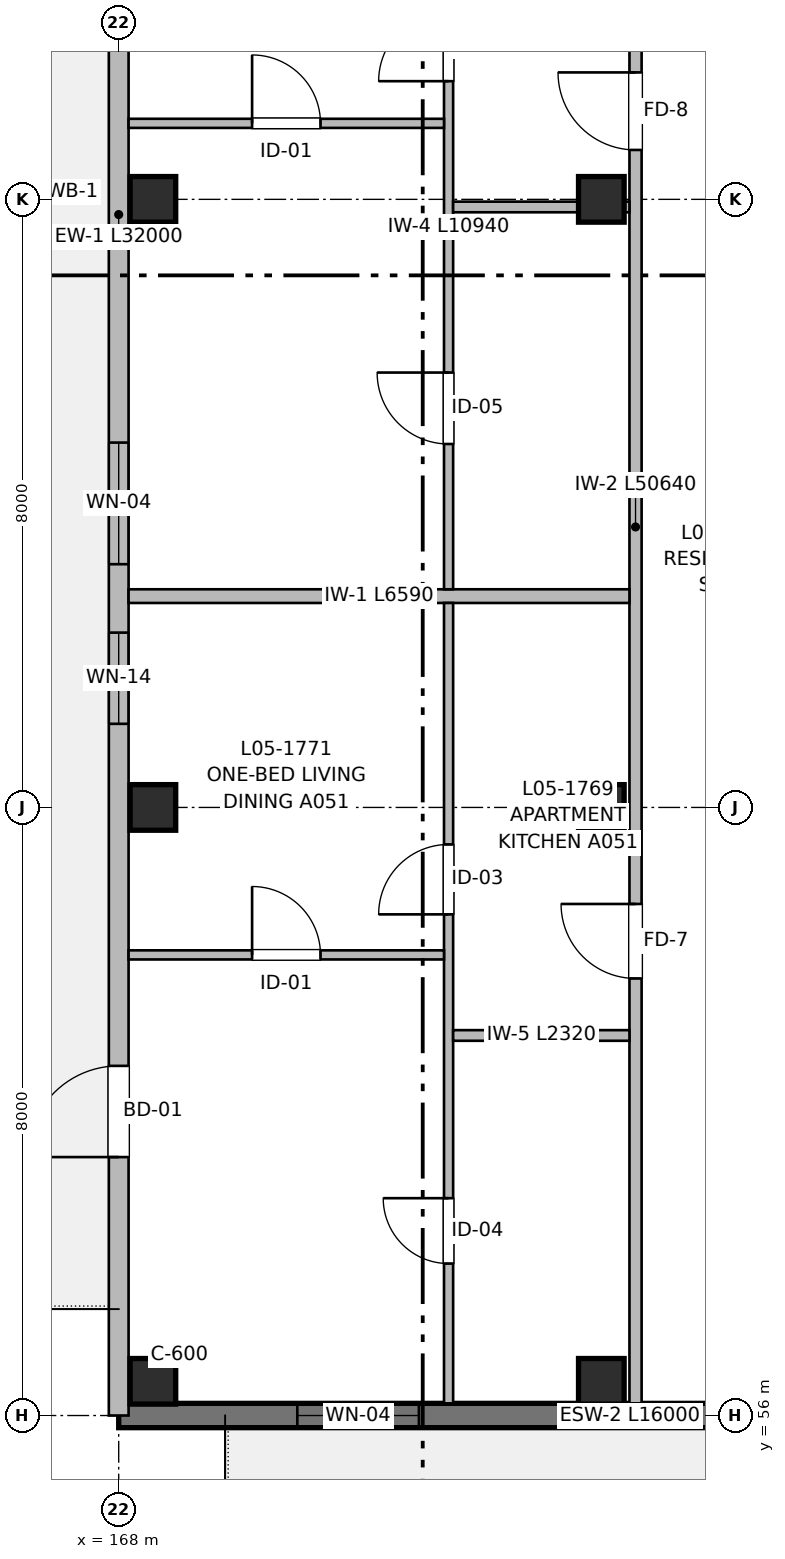
"""IFC4 building model, lengths in metres.
Left out: names, types, materials, properties, quantities, classifications, styles, units other than length and angle.
Written with IfcOpenShell. Run it as: python <this file> out.ifc"""

import sys

from ifc_helpers import new_model, si_unit, direction, frame, frame_2d, origin, origin_2d, place, context, subcontext, project, spatial, rectangle, extrude, element, fill, save


model = new_model("IFC4")
c1 = context("Model", 3, precision=1e-05, world=origin(), true_north=direction((0.0, 1.0)))
c2 = subcontext(c1, "Body", "Model", "MODEL_VIEW")
j1 = project(units=[si_unit("LENGTHUNIT", "METRE"), si_unit("PLANEANGLEUNIT", "RADIAN")], contexts=[c1])
p1 = place(None, origin())
s1 = spatial("IfcSite", under=j1, at=p1, CompositionType="ELEMENT")
p2 = place(p1, origin())
s2 = spatial("IfcBuilding", under=s1, at=p2, CompositionType="ELEMENT")
p3 = place(p2, frame((0.0, 0.0, 16.96)))
s3 = spatial("IfcBuildingStorey", under=s2, at=p3, CompositionType="ELEMENT", Elevation=16.96)
for number, where, z_axis, x_axis in (
    (1, (168.45, 56.45, 0.0), (0.0, 0.0, 1.0), (1.0, 0.0, 0.0)),
    (2, (168.45, 64.0, 0.0), (0.0, 0.0, 1.0), (1.0, 0.0, 0.0)),
    (3, (168.45, 72.0, 0.0), (0.0, 0.0, 1.0), (1.0, 0.0, 0.0)),
    (4, (174.35, 56.45, 0.0), (0.0, 0.0, 1.0), (1.0, 0.0, 0.0)),
    (5, (174.35, 64.0, 0.0), (0.0, 0.0, 1.0), (1.0, 0.0, 0.0)),
    (6, (174.35, 72.0, 0.0), (0.0, 0.0, 1.0), (1.0, 0.0, 0.0)),
):
    element("IfcColumn", number, at=place(p3, frame(where, z_axis=z_axis, x_axis=x_axis)), inside=s3, PredefinedType="COLUMN", context=c2, shape_type="SweptSolid", body=[
        extrude(rectangle(XDim=0.6, YDim=0.6, at=origin_2d()), origin(), (0.0, 0.0, 1.0), 3.2),
    ])
p4 = place(p3, frame((184.0, 56.0, 0.0), z_axis=(0.0, 0.0, 1.0), x_axis=(-1.0, 0.0, 0.0)))
e7 = element("IfcWall", 7, at=p4, inside=s3, PredefinedType="SHEAR", context=c2, shape_type="SweptSolid", body=[
    extrude(rectangle(XDim=16.0, YDim=0.32, at=frame_2d((8.0, 0.0))), origin(), (0.0, 0.0, 1.0), 2.98),
])
p5 = place(p4, frame((3.4, 0.0, 0.0)))
e8 = element("IfcOpeningElement", 8, at=p5, cuts=e7, PredefinedType="OPENING", context=c2, shape_type="SweptSolid", body=[
    extrude(rectangle(XDim=1.2, YDim=2.2, at=frame_2d((0.6, 1.1))), frame((0.0, 0.17, 0.0), z_axis=(0.0, -1.0, 0.0), x_axis=(1.0, 0.0, 0.0)), (0.0, 0.0, 1.0), 0.34),
])
p6 = place(p4, frame((5.3, 0.0, 0.9)))
e9 = element("IfcOpeningElement", 9, at=p6, cuts=e7, PredefinedType="OPENING", context=c2, shape_type="SweptSolid", body=[
    extrude(rectangle(XDim=1.2, YDim=1.05, at=frame_2d((0.6, 0.525))), frame((0.0, 0.17, 0.0), z_axis=(0.0, -1.0, 0.0), x_axis=(1.0, 0.0, 0.0)), (0.0, 0.0, 1.0), 0.34),
])
p7 = place(p4, frame((12.05, 0.0, 0.77)))
e10 = element("IfcOpeningElement", 10, at=p7, cuts=e7, PredefinedType="OPENING", context=c2, shape_type="SweptSolid", body=[
    extrude(rectangle(XDim=1.6, YDim=1.45, at=frame_2d((0.8, 0.725))), frame((0.0, 0.17, 0.0), z_axis=(0.0, -1.0, 0.0), x_axis=(1.0, 0.0, 0.0)), (0.0, 0.0, 1.0), 0.34),
])
p8 = place(p3, frame((168.0, 56.0, 0.0), z_axis=(0.0, 0.0, 1.0), x_axis=(0.0, 1.0, 0.0)))
e11 = element("IfcWall", 11, at=p8, inside=s3, PredefinedType="SOLIDWALL", context=c2, shape_type="SweptSolid", body=[
    extrude(rectangle(XDim=32.0, YDim=0.26, at=frame_2d((16.0, 0.0))), origin(), (0.0, 0.0, 1.0), 2.98),
])
p9 = place(p8, frame((3.4, 0.0, 0.0)))
e12 = element("IfcOpeningElement", 12, at=p9, cuts=e11, PredefinedType="OPENING", context=c2, shape_type="SweptSolid", body=[
    extrude(rectangle(XDim=1.2, YDim=2.2, at=frame_2d((0.6, 1.1))), frame((0.0, 0.14, 0.0), z_axis=(0.0, -1.0, 0.0), x_axis=(1.0, 0.0, 0.0)), (0.0, 0.0, 1.0), 0.28),
])
p10 = place(p8, frame((9.1, 0.0, 0.9)))
e13 = element("IfcOpeningElement", 13, at=p10, cuts=e11, PredefinedType="OPENING", context=c2, shape_type="SweptSolid", body=[
    extrude(rectangle(XDim=1.2, YDim=1.05, at=frame_2d((0.6, 0.525))), frame((0.0, 0.14, 0.0), z_axis=(0.0, -1.0, 0.0), x_axis=(1.0, 0.0, 0.0)), (0.0, 0.0, 1.0), 0.28),
])
p11 = place(p8, frame((11.2, 0.0, 0.77)))
e14 = element("IfcOpeningElement", 14, at=p11, cuts=e11, PredefinedType="OPENING", context=c2, shape_type="SweptSolid", body=[
    extrude(rectangle(XDim=1.6, YDim=1.45, at=frame_2d((0.8, 0.725))), frame((0.0, 0.14, 0.0), z_axis=(0.0, -1.0, 0.0), x_axis=(1.0, 0.0, 0.0)), (0.0, 0.0, 1.0), 0.28),
])
p12 = place(p8, frame((18.8, 0.0, 0.72)))
e15 = element("IfcOpeningElement", 15, at=p12, cuts=e11, PredefinedType="OPENING", context=c2, shape_type="SweptSolid", body=[
    extrude(rectangle(XDim=2.4, YDim=1.5, at=frame_2d((1.2, 0.75))), frame((0.0, 0.14, 0.0), z_axis=(0.0, -1.0, 0.0), x_axis=(1.0, 0.0, 0.0)), (0.0, 0.0, 1.0), 0.28),
])
p13 = place(p8, frame((27.25, 0.0, 0.82)))
e16 = element("IfcOpeningElement", 16, at=p13, cuts=e11, PredefinedType="OPENING", context=c2, shape_type="SweptSolid", body=[
    extrude(rectangle(XDim=1.5, YDim=1.4, at=frame_2d((0.75, 0.7))), frame((0.0, 0.14, 0.0), z_axis=(0.0, -1.0, 0.0), x_axis=(1.0, 0.0, 0.0)), (0.0, 0.0, 1.0), 0.28),
])
p14 = place(p8, frame((22.16, 0.0, 0.87)))
e17 = element("IfcOpeningElement", 17, at=p14, cuts=e11, PredefinedType="OPENING", context=c2, shape_type="SweptSolid", body=[
    extrude(rectangle(XDim=1.4, YDim=1.35, at=frame_2d((0.7, 0.675))), frame((0.0, 0.14, 0.0), z_axis=(0.0, -1.0, 0.0), x_axis=(1.0, 0.0, 0.0)), (0.0, 0.0, 1.0), 0.28),
])
p15 = place(p3, frame((174.8, 56.16, 0.0), z_axis=(0.0, 0.0, 1.0), x_axis=(0.0, 1.0, 0.0)))
e18 = element("IfcWall", 18, at=p15, inside=s3, PredefinedType="PARTITIONING", context=c2, shape_type="SweptSolid", body=[
    extrude(rectangle(XDim=50.64, YDim=0.16, at=frame_2d((25.32, 0.0))), origin(), (0.0, 0.0, 1.0), 2.935),
])
p16 = place(p15, frame((5.59, 0.0, 0.0)))
e19 = element("IfcOpeningElement", 19, at=p16, cuts=e18, PredefinedType="OPENING", context=c2, shape_type="SweptSolid", body=[
    extrude(rectangle(XDim=0.98, YDim=2.15, at=frame_2d((0.49, 1.075))), frame((0.0, 0.09, 0.0), z_axis=(0.0, -1.0, 0.0), x_axis=(1.0, 0.0, 0.0)), (0.0, 0.0, 1.0), 0.18),
])
p17 = place(p15, frame((16.49, 0.0, 0.0)))
e20 = element("IfcOpeningElement", 20, at=p17, cuts=e18, PredefinedType="OPENING", context=c2, shape_type="SweptSolid", body=[
    extrude(rectangle(XDim=1.02, YDim=2.15, at=frame_2d((0.51, 1.075))), frame((0.0, 0.09, 0.0), z_axis=(0.0, -1.0, 0.0), x_axis=(1.0, 0.0, 0.0)), (0.0, 0.0, 1.0), 0.18),
])
p18 = place(p15, frame((28.55, 0.0, 0.0)))
e21 = element("IfcOpeningElement", 21, at=p18, cuts=e18, PredefinedType="OPENING", context=c2, shape_type="SweptSolid", body=[
    extrude(rectangle(XDim=0.98, YDim=2.15, at=frame_2d((0.49, 1.075))), frame((0.0, 0.09, 0.0), z_axis=(0.0, -1.0, 0.0), x_axis=(1.0, 0.0, 0.0)), (0.0, 0.0, 1.0), 0.18),
])
p19 = place(p15, frame((42.9, 0.0, 0.0)))
e22 = element("IfcOpeningElement", 22, at=p19, cuts=e18, PredefinedType="OPENING", context=c2, shape_type="SweptSolid", body=[
    extrude(rectangle(XDim=0.98, YDim=2.15, at=frame_2d((0.49, 1.075))), frame((0.0, 0.09, 0.0), z_axis=(0.0, -1.0, 0.0), x_axis=(1.0, 0.0, 0.0)), (0.0, 0.0, 1.0), 0.18),
])
p20 = place(p3, frame((168.13, 66.78, 0.0), z_axis=(0.0, 0.0, 1.0), x_axis=(1.0, 0.0, 0.0)))
e23 = element("IfcWall", 23, at=p20, inside=s3, PredefinedType="PARTITIONING", context=c2, shape_type="SweptSolid", body=[
    extrude(rectangle(XDim=6.59, YDim=0.18, at=frame_2d((3.295, 0.0))), origin(), (0.0, 0.0, 1.0), 2.935),
])
p21 = place(p3, frame((172.34, 56.16, 0.0), z_axis=(0.0, 0.0, 1.0), x_axis=(0.0, 1.0, 0.0)))
e24 = element("IfcWall", 24, at=p21, inside=s3, PredefinedType="PARTITIONING", context=c2, shape_type="SweptSolid", body=[
    extrude(rectangle(XDim=10.53, YDim=0.12, at=frame_2d((5.265, 0.0))), origin(), (0.0, 0.0, 1.0), 2.935),
])
p22 = place(p21, frame((1.839, 0.0, 0.0)))
e25 = element("IfcOpeningElement", 25, at=p22, cuts=e24, PredefinedType="OPENING", context=c2, shape_type="SweptSolid", body=[
    extrude(rectangle(XDim=0.86, YDim=2.1, at=frame_2d((0.43, 1.05))), frame((0.0, 0.07, 0.0), z_axis=(0.0, -1.0, 0.0), x_axis=(1.0, 0.0, 0.0)), (0.0, 0.0, 1.0), 0.14),
])
p23 = place(p21, frame((6.433, 0.0, 0.0)))
e26 = element("IfcOpeningElement", 26, at=p23, cuts=e24, PredefinedType="OPENING", context=c2, shape_type="SweptSolid", body=[
    extrude(rectangle(XDim=0.92, YDim=2.1, at=frame_2d((0.46, 1.05))), frame((0.0, 0.07, 0.0), z_axis=(0.0, -1.0, 0.0), x_axis=(1.0, 0.0, 0.0)), (0.0, 0.0, 1.0), 0.14),
])
p24 = place(p3, frame((172.4, 61.0, 0.0), z_axis=(0.0, 0.0, 1.0), x_axis=(1.0, 0.0, 0.0)))
e27 = element("IfcWall", 27, at=p24, inside=s3, PredefinedType="PARTITIONING", context=c2, shape_type="SweptSolid", body=[
    extrude(rectangle(XDim=2.32, YDim=0.14, at=frame_2d((1.16, 0.0))), origin(), (0.0, 0.0, 1.0), 2.935),
])
p25 = place(p3, frame((168.13, 62.06, 0.0), z_axis=(0.0, 0.0, 1.0), x_axis=(1.0, 0.0, 0.0)))
e28 = element("IfcWall", 28, at=p25, inside=s3, PredefinedType="PARTITIONING", context=c2, shape_type="SweptSolid", body=[
    extrude(rectangle(XDim=4.15, YDim=0.12, at=frame_2d((2.075, 0.0))), origin(), (0.0, 0.0, 1.0), 2.935),
])
p26 = place(p25, frame((1.625, 0.0, 0.0)))
e29 = element("IfcOpeningElement", 29, at=p26, cuts=e28, PredefinedType="OPENING", context=c2, shape_type="SweptSolid", body=[
    extrude(rectangle(XDim=0.9, YDim=2.1, at=frame_2d((0.45, 1.05))), frame((0.0, 0.07, 0.0), z_axis=(0.0, -1.0, 0.0), x_axis=(1.0, 0.0, 0.0)), (0.0, 0.0, 1.0), 0.14),
])
p27 = place(p3, frame((172.34, 66.87, 0.0), z_axis=(0.0, 0.0, 1.0), x_axis=(0.0, 1.0, 0.0)))
e30 = element("IfcWall", 30, at=p27, inside=s3, PredefinedType="PARTITIONING", context=c2, shape_type="SweptSolid", body=[
    extrude(rectangle(XDim=10.94, YDim=0.12, at=frame_2d((5.47, 0.0))), origin(), (0.0, 0.0, 1.0), 2.935),
])
p28 = place(p27, frame((1.911, 0.0, 0.0)))
e31 = element("IfcOpeningElement", 31, at=p28, cuts=e30, PredefinedType="OPENING", context=c2, shape_type="SweptSolid", body=[
    extrude(rectangle(XDim=0.94, YDim=2.1, at=frame_2d((0.47, 1.05))), frame((0.0, 0.07, 0.0), z_axis=(0.0, -1.0, 0.0), x_axis=(1.0, 0.0, 0.0)), (0.0, 0.0, 1.0), 0.14),
])
p29 = place(p27, frame((6.685, 0.0, 0.0)))
e32 = element("IfcOpeningElement", 32, at=p29, cuts=e30, PredefinedType="OPENING", context=c2, shape_type="SweptSolid", body=[
    extrude(rectangle(XDim=0.92, YDim=2.1, at=frame_2d((0.46, 1.05))), frame((0.0, 0.07, 0.0), z_axis=(0.0, -1.0, 0.0), x_axis=(1.0, 0.0, 0.0)), (0.0, 0.0, 1.0), 0.14),
])
p30 = place(p3, frame((172.4, 71.9, 0.0), z_axis=(0.0, 0.0, 1.0), x_axis=(1.0, 0.0, 0.0)))
e33 = element("IfcWall", 33, at=p30, inside=s3, PredefinedType="PARTITIONING", context=c2, shape_type="SweptSolid", body=[
    extrude(rectangle(XDim=2.32, YDim=0.14, at=frame_2d((1.16, 0.0))), origin(), (0.0, 0.0, 1.0), 2.53),
])
p31 = place(p3, frame((168.13, 73.0, 0.0), z_axis=(0.0, 0.0, 1.0), x_axis=(1.0, 0.0, 0.0)))
e34 = element("IfcWall", 34, at=p31, inside=s3, PredefinedType="PARTITIONING", context=c2, shape_type="SweptSolid", body=[
    extrude(rectangle(XDim=4.15, YDim=0.12, at=frame_2d((2.075, 0.0))), origin(), (0.0, 0.0, 1.0), 2.935),
])
p32 = place(p31, frame((1.625, 0.0, 0.0)))
e35 = element("IfcOpeningElement", 35, at=p32, cuts=e34, PredefinedType="OPENING", context=c2, shape_type="SweptSolid", body=[
    extrude(rectangle(XDim=0.9, YDim=2.1, at=frame_2d((0.45, 1.05))), frame((0.0, 0.07, 0.0), z_axis=(0.0, -1.0, 0.0), x_axis=(1.0, 0.0, 0.0)), (0.0, 0.0, 1.0), 0.14),
])
p33 = place(p7, origin())
e36 = element("IfcWindow", 36, at=p33, inside=s3, PartitioningType="SINGLE_PANEL", PredefinedType="WINDOW", context=c2, shape_type="SweptSolid", body=[
    extrude(rectangle(XDim=1.6, YDim=1.45, at=frame_2d((0.8, 0.725))), frame((0.0, 0.03, 0.0), z_axis=(0.0, -1.0, 0.0), x_axis=(1.0, 0.0, 0.0)), (0.0, 0.0, 1.0), 0.06),
])
fill(e10, e36)
p34 = place(p9, origin())
e37 = element("IfcDoor", 37, at=p34, inside=s3, OperationType="SINGLE_SWING_LEFT", PredefinedType="DOOR", context=c2, shape_type="SweptSolid", body=[
    extrude(rectangle(XDim=1.2, YDim=2.2, at=frame_2d((0.6, 1.1))), frame((0.0, 0.025, 0.0), z_axis=(0.0, -1.0, 0.0), x_axis=(1.0, 0.0, 0.0)), (0.0, 0.0, 1.0), 0.05),
])
fill(e12, e37)
p35 = place(p10, origin())
e38 = element("IfcWindow", 38, at=p35, inside=s3, PartitioningType="SINGLE_PANEL", PredefinedType="WINDOW", context=c2, shape_type="SweptSolid", body=[
    extrude(rectangle(XDim=1.2, YDim=1.05, at=frame_2d((0.6, 0.525))), frame((0.0, 0.03, 0.0), z_axis=(0.0, -1.0, 0.0), x_axis=(1.0, 0.0, 0.0)), (0.0, 0.0, 1.0), 0.06),
])
fill(e13, e38)
p36 = place(p11, origin())
e39 = element("IfcWindow", 39, at=p36, inside=s3, PartitioningType="SINGLE_PANEL", PredefinedType="WINDOW", context=c2, shape_type="SweptSolid", body=[
    extrude(rectangle(XDim=1.6, YDim=1.45, at=frame_2d((0.8, 0.725))), frame((0.0, 0.03, 0.0), z_axis=(0.0, -1.0, 0.0), x_axis=(1.0, 0.0, 0.0)), (0.0, 0.0, 1.0), 0.06),
])
fill(e14, e39)
p37 = place(p22, origin())
e40 = element("IfcDoor", 40, at=p37, inside=s3, OperationType="SINGLE_SWING_RIGHT", PredefinedType="DOOR", context=c2, shape_type="SweptSolid", body=[
    extrude(rectangle(XDim=0.86, YDim=2.1, at=frame_2d((0.43, 1.05))), frame((0.0, 0.025, 0.0), z_axis=(0.0, -1.0, 0.0), x_axis=(1.0, 0.0, 0.0)), (0.0, 0.0, 1.0), 0.05),
])
fill(e25, e40)
p38 = place(p23, origin())
e41 = element("IfcDoor", 41, at=p38, inside=s3, OperationType="SINGLE_SWING_LEFT", PredefinedType="DOOR", context=c2, shape_type="SweptSolid", body=[
    extrude(rectangle(XDim=0.92, YDim=2.1, at=frame_2d((0.46, 1.05))), frame((0.0, 0.025, 0.0), z_axis=(0.0, -1.0, 0.0), x_axis=(1.0, 0.0, 0.0)), (0.0, 0.0, 1.0), 0.05),
])
fill(e26, e41)
p39 = place(p16, origin())
e42 = element("IfcDoor", 42, at=p39, inside=s3, OperationType="SINGLE_SWING_RIGHT", PredefinedType="DOOR", context=c2, shape_type="SweptSolid", body=[
    extrude(rectangle(XDim=0.98, YDim=2.15, at=frame_2d((0.49, 1.075))), frame((0.0, 0.025, 0.0), z_axis=(0.0, -1.0, 0.0), x_axis=(1.0, 0.0, 0.0)), (0.0, 0.0, 1.0), 0.05),
])
fill(e19, e42)
p40 = place(p26, origin())
e43 = element("IfcDoor", 43, at=p40, inside=s3, OperationType="SINGLE_SWING_LEFT", PredefinedType="DOOR", context=c2, shape_type="SweptSolid", body=[
    extrude(rectangle(XDim=0.9, YDim=2.1, at=frame_2d((0.45, 1.05))), frame((0.0, 0.025, 0.0), z_axis=(0.0, -1.0, 0.0), x_axis=(1.0, 0.0, 0.0)), (0.0, 0.0, 1.0), 0.05),
])
fill(e29, e43)
p41 = place(p28, origin())
e44 = element("IfcDoor", 44, at=p41, inside=s3, OperationType="SINGLE_SWING_RIGHT", PredefinedType="DOOR", context=c2, shape_type="SweptSolid", body=[
    extrude(rectangle(XDim=0.94, YDim=2.1, at=frame_2d((0.47, 1.05))), frame((0.0, 0.025, 0.0), z_axis=(0.0, -1.0, 0.0), x_axis=(1.0, 0.0, 0.0)), (0.0, 0.0, 1.0), 0.05),
])
fill(e31, e44)
p42 = place(p29, origin())
e45 = element("IfcDoor", 45, at=p42, inside=s3, OperationType="SINGLE_SWING_LEFT", PredefinedType="DOOR", context=c2, shape_type="SweptSolid", body=[
    extrude(rectangle(XDim=0.92, YDim=2.1, at=frame_2d((0.46, 1.05))), frame((0.0, 0.025, 0.0), z_axis=(0.0, -1.0, 0.0), x_axis=(1.0, 0.0, 0.0)), (0.0, 0.0, 1.0), 0.05),
])
fill(e32, e45)
p43 = place(p17, origin())
e46 = element("IfcDoor", 46, at=p43, inside=s3, OperationType="SINGLE_SWING_RIGHT", PredefinedType="DOOR", context=c2, shape_type="SweptSolid", body=[
    extrude(rectangle(XDim=1.02, YDim=2.15, at=frame_2d((0.51, 1.075))), frame((0.0, 0.025, 0.0), z_axis=(0.0, -1.0, 0.0), x_axis=(1.0, 0.0, 0.0)), (0.0, 0.0, 1.0), 0.05),
])
fill(e20, e46)
p44 = place(p32, origin())
e47 = element("IfcDoor", 47, at=p44, inside=s3, OperationType="SINGLE_SWING_LEFT", PredefinedType="DOOR", context=c2, shape_type="SweptSolid", body=[
    extrude(rectangle(XDim=0.9, YDim=2.1, at=frame_2d((0.45, 1.05))), frame((0.0, 0.025, 0.0), z_axis=(0.0, -1.0, 0.0), x_axis=(1.0, 0.0, 0.0)), (0.0, 0.0, 1.0), 0.05),
])
fill(e35, e47)
save(model, sys.argv[1])
